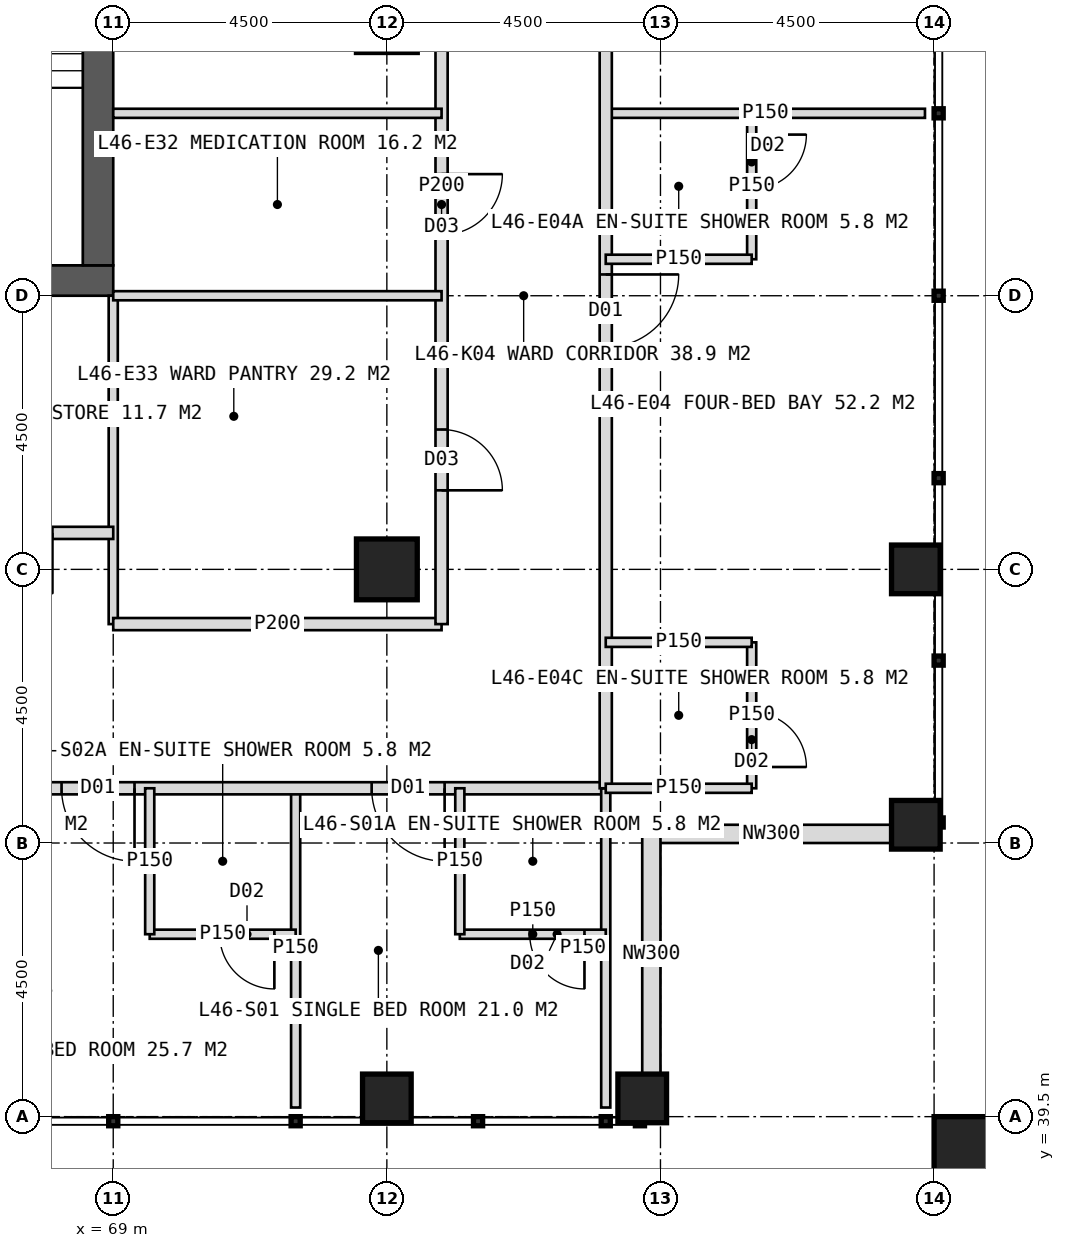
"""IFC4 building model, lengths in metres.
Left out: names, types, materials, properties, quantities, classifications, styles, units other than length and angle.
Written with IfcOpenShell. Run it as: python <this file> out.ifc"""

import sys

from ifc_helpers import new_model, si_unit, direction, frame, frame_2d, origin, origin_2d, place, context, subcontext, project, spatial, rectangle, hollow_rectangle, extrude, element, fill, save


model = new_model("IFC4")
c1 = context("Model", 3, precision=1e-05, world=origin(), true_north=direction((0.0, 1.0)))
c2 = subcontext(c1, "Body", "Model", "MODEL_VIEW")
j1 = project(units=[si_unit("LENGTHUNIT", "METRE"), si_unit("PLANEANGLEUNIT", "RADIAN")], contexts=[c1])
p1 = place(None, origin())
s1 = spatial("IfcSite", under=j1, at=p1, CompositionType="ELEMENT")
p2 = place(p1, origin())
s2 = spatial("IfcBuilding", under=s1, at=p2, CompositionType="ELEMENT")
p3 = place(p2, frame((0.0, 0.0, 193.0)))
s3 = spatial("IfcBuildingStorey", under=s2, at=p3, CompositionType="ELEMENT", Elevation=193.0)
p4 = place(p3, frame((51.0, 53.25, 0.0), z_axis=(0.0, 0.0, 1.0), x_axis=(1.0, 0.0, 0.0)))
e1 = element("IfcWall", 1, at=p4, inside=s3, PredefinedType="SHEAR", context=c2, shape_type="SweptSolid", body=[
    extrude(rectangle(XDim=18.0, YDim=0.5, at=frame_2d((9.0, 0.0))), origin(), (0.0, 0.0, 1.0), 4.0),
])
p5 = place(p4, frame((8.1, 0.0, 0.0)))
e2 = element("IfcOpeningElement", 2, at=p5, cuts=e1, PredefinedType="OPENING", context=c2, shape_type="SweptSolid", body=[
    extrude(rectangle(XDim=1.8, YDim=2.2, at=frame_2d((0.9, 1.1))), frame((0.0, 0.26, 0.0), z_axis=(0.0, -1.0, 0.0), x_axis=(1.0, 0.0, 0.0)), (0.0, 0.0, 1.0), 0.52),
])
p6 = place(p3, frame((68.75, 53.5, 0.0), z_axis=(0.0, 0.0, 1.0), x_axis=(0.0, 1.0, 0.0)))
e3 = element("IfcWall", 3, at=p6, inside=s3, PredefinedType="SHEAR", context=c2, shape_type="SweptSolid", body=[
    extrude(rectangle(XDim=17.0, YDim=0.5, at=frame_2d((8.5, 0.0))), origin(), (0.0, 0.0, 1.0), 4.0),
])
p7 = place(p6, frame((9.6, 0.0, 0.0)))
e4 = element("IfcOpeningElement", 4, at=p7, cuts=e3, PredefinedType="OPENING", context=c2, shape_type="SweptSolid", body=[
    extrude(rectangle(XDim=1.5, YDim=2.2, at=frame_2d((0.75, 1.1))), frame((0.0, 0.26, 0.0), z_axis=(0.0, -1.0, 0.0), x_axis=(1.0, 0.0, 0.0)), (0.0, 0.0, 1.0), 0.52),
])
p8 = place(p3, frame((73.5, 48.5, 0.0), z_axis=(0.0, 0.0, 1.0), x_axis=(1.0, 0.0, 0.0)))
e5 = element("IfcColumn", 5, at=p8, inside=s3, PredefinedType="COLUMN", context=c2, shape_type="SweptSolid", body=[
    extrude(hollow_rectangle(XDim=1.0, YDim=1.0, WallThickness=0.1, at=origin_2d()), origin(), (0.0, 0.0, 1.0), 4.0),
])
for number, where, z_axis, x_axis in (
    (6, (82.2, 44.3, 0.0), (0.0, 0.0, 1.0), (1.0, 0.0, 0.0)),
    (7, (82.2, 48.5, 0.0), (0.0, 0.0, 1.0), (1.0, 0.0, 0.0)),
    (8, (73.5, 39.8, 0.0), (0.0, 0.0, 1.0), (1.0, 0.0, 0.0)),
    (9, (77.7, 39.8, 0.0), (0.0, 0.0, 1.0), (1.0, 0.0, 0.0)),
):
    element("IfcColumn", number, at=place(p3, frame(where, z_axis=z_axis, x_axis=x_axis)), inside=s3, PredefinedType="COLUMN", context=c2, shape_type="SweptSolid", body=[
        extrude(hollow_rectangle(XDim=0.8, YDim=0.8, WallThickness=0.08, at=origin_2d()), origin(), (0.0, 0.0, 1.0), 4.0),
    ])
p9 = place(p3, frame((83.1, 38.9, 0.0), z_axis=(0.0, 0.0, 1.0), x_axis=(1.0, 0.0, 0.0)))
e10 = element("IfcColumn", 10, at=p9, inside=s3, PredefinedType="COLUMN", context=c2, shape_type="SweptSolid", body=[
    extrude(hollow_rectangle(XDim=1.2, YDim=1.2, WallThickness=0.07, at=origin_2d()), origin(), (0.0, 0.0, 1.0), 4.0),
])
for number, where, z_axis, x_axis in (
    (11, (81.8, 44.15, 0.0), (0.0, 0.0, 1.0), (-1.0, 0.0, 0.0)),
    (12, (77.85, 44.15, 0.0), (0.0, 0.0, 1.0), (0.0, -1.0, 0.0)),
):
    element("IfcWall", number, at=place(p3, frame(where, z_axis=z_axis, x_axis=x_axis)), inside=s3, PredefinedType="ELEMENTEDWALL", context=c2, shape_type="SweptSolid", body=[
        extrude(rectangle(XDim=3.95, YDim=0.3, at=frame_2d((1.975, 0.0))), origin(), (0.0, 0.0, 1.0), 2.85),
    ])
p10 = place(p3, frame((72.0, 44.9, 0.0), z_axis=(0.0, 0.0, 1.0), x_axis=(0.0, -1.0, 0.0)))
e13 = element("IfcWall", 13, at=p10, inside=s3, PredefinedType="PARTITIONING", context=c2, shape_type="SweptSolid", body=[
    extrude(rectangle(XDim=5.25, YDim=0.15, at=frame_2d((2.625, 0.0))), origin(), (0.0, 0.0, 1.0), 3.75),
])
p11 = place(p3, frame((77.1, 44.9, 0.0), z_axis=(0.0, 0.0, 1.0), x_axis=(-1.0, 0.0, 0.0)))
e14 = element("IfcWall", 14, at=p11, inside=s3, PredefinedType="PARTITIONING", context=c2, shape_type="SweptSolid", body=[
    extrude(rectangle(XDim=34.2, YDim=0.2, at=frame_2d((17.1, 0.0))), origin(), (0.0, 0.0, 1.0), 3.75),
])
p12 = place(p11, frame((2.65, 0.0, 0.0)))
e15 = element("IfcOpeningElement", 15, at=p12, cuts=e14, PredefinedType="OPENING", context=c2, shape_type="SweptSolid", body=[
    extrude(rectangle(XDim=1.2, YDim=2.2, at=frame_2d((0.6, 1.1))), frame((0.0, 0.11, 0.0), z_axis=(0.0, -1.0, 0.0), x_axis=(1.0, 0.0, 0.0)), (0.0, 0.0, 1.0), 0.22),
])
p13 = place(p11, frame((7.75, 0.0, 0.0)))
e16 = element("IfcOpeningElement", 16, at=p13, cuts=e14, PredefinedType="OPENING", context=c2, shape_type="SweptSolid", body=[
    extrude(rectangle(XDim=1.2, YDim=2.2, at=frame_2d((0.6, 1.1))), frame((0.0, 0.11, 0.0), z_axis=(0.0, -1.0, 0.0), x_axis=(1.0, 0.0, 0.0)), (0.0, 0.0, 1.0), 0.22),
])
p14 = place(p11, frame((13.75, 0.0, 0.0)))
e17 = element("IfcOpeningElement", 17, at=p14, cuts=e14, PredefinedType="OPENING", context=c2, shape_type="SweptSolid", body=[
    extrude(rectangle(XDim=1.2, YDim=2.2, at=frame_2d((0.6, 1.1))), frame((0.0, 0.11, 0.0), z_axis=(0.0, -1.0, 0.0), x_axis=(1.0, 0.0, 0.0)), (0.0, 0.0, 1.0), 0.22),
])
p15 = place(p11, frame((19.75, 0.0, 0.0)))
e18 = element("IfcOpeningElement", 18, at=p15, cuts=e14, PredefinedType="OPENING", context=c2, shape_type="SweptSolid", body=[
    extrude(rectangle(XDim=1.2, YDim=2.2, at=frame_2d((0.6, 1.1))), frame((0.0, 0.11, 0.0), z_axis=(0.0, -1.0, 0.0), x_axis=(1.0, 0.0, 0.0)), (0.0, 0.0, 1.0), 0.22),
])
p16 = place(p11, frame((25.75, 0.0, 0.0)))
e19 = element("IfcOpeningElement", 19, at=p16, cuts=e14, PredefinedType="OPENING", context=c2, shape_type="SweptSolid", body=[
    extrude(rectangle(XDim=1.2, YDim=2.2, at=frame_2d((0.6, 1.1))), frame((0.0, 0.11, 0.0), z_axis=(0.0, -1.0, 0.0), x_axis=(1.0, 0.0, 0.0)), (0.0, 0.0, 1.0), 0.22),
])
p17 = place(p3, frame((77.1, 44.9, 0.0), z_axis=(0.0, 0.0, 1.0), x_axis=(0.0, -1.0, 0.0)))
e20 = element("IfcWall", 20, at=p17, inside=s3, PredefinedType="PARTITIONING", context=c2, shape_type="SweptSolid", body=[
    extrude(rectangle(XDim=5.25, YDim=0.15, at=frame_2d((2.625, 0.0))), origin(), (0.0, 0.0, 1.0), 3.75),
])
p18 = place(p3, frame((77.1, 42.5, 0.0), z_axis=(0.0, 0.0, 1.0), x_axis=(-1.0, 0.0, 0.0)))
e21 = element("IfcWall", 21, at=p18, inside=s3, PredefinedType="PARTITIONING", context=c2, shape_type="SweptSolid", body=[
    extrude(rectangle(XDim=2.4, YDim=0.15, at=frame_2d((1.2, 0.0))), origin(), (0.0, 0.0, 1.0), 3.75),
])
p19 = place(p18, frame((0.35, 0.0, 0.0)))
e22 = element("IfcOpeningElement", 22, at=p19, cuts=e21, PredefinedType="OPENING", context=c2, shape_type="SweptSolid", body=[
    extrude(rectangle(XDim=0.9, YDim=2.1, at=frame_2d((0.45, 1.05))), frame((0.0, 0.085, 0.0), z_axis=(0.0, -1.0, 0.0), x_axis=(1.0, 0.0, 0.0)), (0.0, 0.0, 1.0), 0.17),
])
p20 = place(p3, frame((74.7, 44.9, 0.0), z_axis=(0.0, 0.0, 1.0), x_axis=(0.0, -1.0, 0.0)))
e23 = element("IfcWall", 23, at=p20, inside=s3, PredefinedType="PARTITIONING", context=c2, shape_type="SweptSolid", body=[
    extrude(rectangle(XDim=2.4, YDim=0.15, at=frame_2d((1.2, 0.0))), origin(), (0.0, 0.0, 1.0), 3.75),
])
p21 = place(p3, frame((72.0, 42.5, 0.0), z_axis=(0.0, 0.0, 1.0), x_axis=(-1.0, 0.0, 0.0)))
e24 = element("IfcWall", 24, at=p21, inside=s3, PredefinedType="PARTITIONING", context=c2, shape_type="SweptSolid", body=[
    extrude(rectangle(XDim=2.4, YDim=0.15, at=frame_2d((1.2, 0.0))), origin(), (0.0, 0.0, 1.0), 3.75),
])
p22 = place(p21, frame((0.35, 0.0, 0.0)))
e25 = element("IfcOpeningElement", 25, at=p22, cuts=e24, PredefinedType="OPENING", context=c2, shape_type="SweptSolid", body=[
    extrude(rectangle(XDim=0.9, YDim=2.1, at=frame_2d((0.45, 1.05))), frame((0.0, 0.085, 0.0), z_axis=(0.0, -1.0, 0.0), x_axis=(1.0, 0.0, 0.0)), (0.0, 0.0, 1.0), 0.17),
])
p23 = place(p3, frame((69.6, 44.9, 0.0), z_axis=(0.0, 0.0, 1.0), x_axis=(0.0, -1.0, 0.0)))
e26 = element("IfcWall", 26, at=p23, inside=s3, PredefinedType="PARTITIONING", context=c2, shape_type="SweptSolid", body=[
    extrude(rectangle(XDim=2.4, YDim=0.15, at=frame_2d((1.2, 0.0))), origin(), (0.0, 0.0, 1.0), 3.75),
])
p24 = place(p3, frame((69.0, 53.0, 0.0), z_axis=(0.0, 0.0, 1.0), x_axis=(0.0, -1.0, 0.0)))
e27 = element("IfcWall", 27, at=p24, inside=s3, PredefinedType="PARTITIONING", context=c2, shape_type="SweptSolid", body=[
    extrude(rectangle(XDim=5.4, YDim=0.15, at=frame_2d((2.7, 0.0))), origin(), (0.0, 0.0, 1.0), 3.75),
])
p25 = place(p3, frame((74.4, 47.6, 0.0), z_axis=(0.0, 0.0, 1.0), x_axis=(-1.0, 0.0, 0.0)))
e28 = element("IfcWall", 28, at=p25, inside=s3, PredefinedType="PARTITIONING", context=c2, shape_type="SweptSolid", body=[
    extrude(rectangle(XDim=5.4, YDim=0.2, at=frame_2d((2.7, 0.0))), origin(), (0.0, 0.0, 1.0), 3.75),
])
p26 = place(p3, frame((69.0, 49.1, 0.0), z_axis=(0.0, 0.0, 1.0), x_axis=(-1.0, 0.0, 0.0)))
e29 = element("IfcWall", 29, at=p26, inside=s3, PredefinedType="PARTITIONING", context=c2, shape_type="SweptSolid", body=[
    extrude(rectangle(XDim=6.75, YDim=0.2, at=frame_2d((3.375, 0.0))), origin(), (0.0, 0.0, 1.0), 3.75),
])
p27 = place(p26, frame((1.0, 0.0, 0.0)))
e30 = element("IfcOpeningElement", 30, at=p27, cuts=e29, PredefinedType="OPENING", context=c2, shape_type="SweptSolid", body=[
    extrude(rectangle(XDim=1.0, YDim=2.1, at=frame_2d((0.5, 1.05))), frame((0.0, 0.11, 0.0), z_axis=(0.0, -1.0, 0.0), x_axis=(1.0, 0.0, 0.0)), (0.0, 0.0, 1.0), 0.22),
])
p28 = place(p26, frame((5.425, 0.0, 0.0)))
e31 = element("IfcOpeningElement", 31, at=p28, cuts=e29, PredefinedType="OPENING", context=c2, shape_type="SweptSolid", body=[
    extrude(rectangle(XDim=1.0, YDim=2.1, at=frame_2d((0.5, 1.05))), frame((0.0, 0.11, 0.0), z_axis=(0.0, -1.0, 0.0), x_axis=(1.0, 0.0, 0.0)), (0.0, 0.0, 1.0), 0.22),
])
p29 = place(p3, frame((77.1, 56.0, 0.0), z_axis=(0.0, 0.0, 1.0), x_axis=(1.0, 0.0, 0.0)))
e32 = element("IfcWall", 32, at=p29, inside=s3, PredefinedType="PARTITIONING", context=c2, shape_type="SweptSolid", body=[
    extrude(rectangle(XDim=5.25, YDim=0.15, at=frame_2d((2.625, 0.0))), origin(), (0.0, 0.0, 1.0), 3.75),
])
p30 = place(p3, frame((77.1, 79.1, 0.0), z_axis=(0.0, 0.0, 1.0), x_axis=(0.0, -1.0, 0.0)))
e33 = element("IfcWall", 33, at=p30, inside=s3, PredefinedType="PARTITIONING", context=c2, shape_type="SweptSolid", body=[
    extrude(rectangle(XDim=34.2, YDim=0.2, at=frame_2d((17.1, 0.0))), origin(), (0.0, 0.0, 1.0), 3.75),
])
p31 = place(p30, frame((3.25, 0.0, 0.0)))
e34 = element("IfcOpeningElement", 34, at=p31, cuts=e33, PredefinedType="OPENING", context=c2, shape_type="SweptSolid", body=[
    extrude(rectangle(XDim=1.2, YDim=2.2, at=frame_2d((0.6, 1.1))), frame((0.0, 0.11, 0.0), z_axis=(0.0, -1.0, 0.0), x_axis=(1.0, 0.0, 0.0)), (0.0, 0.0, 1.0), 0.22),
])
p32 = place(p30, frame((11.35, 0.0, 0.0)))
e35 = element("IfcOpeningElement", 35, at=p32, cuts=e33, PredefinedType="OPENING", context=c2, shape_type="SweptSolid", body=[
    extrude(rectangle(XDim=1.2, YDim=2.2, at=frame_2d((0.6, 1.1))), frame((0.0, 0.11, 0.0), z_axis=(0.0, -1.0, 0.0), x_axis=(1.0, 0.0, 0.0)), (0.0, 0.0, 1.0), 0.22),
])
p33 = place(p30, frame((19.75, 0.0, 0.0)))
e36 = element("IfcOpeningElement", 36, at=p33, cuts=e33, PredefinedType="OPENING", context=c2, shape_type="SweptSolid", body=[
    extrude(rectangle(XDim=1.2, YDim=2.2, at=frame_2d((0.6, 1.1))), frame((0.0, 0.11, 0.0), z_axis=(0.0, -1.0, 0.0), x_axis=(1.0, 0.0, 0.0)), (0.0, 0.0, 1.0), 0.22),
])
p34 = place(p30, frame((25.75, 0.0, 0.0)))
e37 = element("IfcOpeningElement", 37, at=p34, cuts=e33, PredefinedType="OPENING", context=c2, shape_type="SweptSolid", body=[
    extrude(rectangle(XDim=1.2, YDim=2.2, at=frame_2d((0.6, 1.1))), frame((0.0, 0.11, 0.0), z_axis=(0.0, -1.0, 0.0), x_axis=(1.0, 0.0, 0.0)), (0.0, 0.0, 1.0), 0.22),
])
p35 = place(p3, frame((79.5, 56.0, 0.0), z_axis=(0.0, 0.0, 1.0), x_axis=(0.0, -1.0, 0.0)))
e38 = element("IfcWall", 38, at=p35, inside=s3, PredefinedType="PARTITIONING", context=c2, shape_type="SweptSolid", body=[
    extrude(rectangle(XDim=2.4, YDim=0.15, at=frame_2d((1.2, 0.0))), origin(), (0.0, 0.0, 1.0), 3.75),
])
p36 = place(p35, frame((0.35, 0.0, 0.0)))
e39 = element("IfcOpeningElement", 39, at=p36, cuts=e38, PredefinedType="OPENING", context=c2, shape_type="SweptSolid", body=[
    extrude(rectangle(XDim=0.9, YDim=2.1, at=frame_2d((0.45, 1.05))), frame((0.0, 0.085, 0.0), z_axis=(0.0, -1.0, 0.0), x_axis=(1.0, 0.0, 0.0)), (0.0, 0.0, 1.0), 0.17),
])
p37 = place(p3, frame((77.1, 53.6, 0.0), z_axis=(0.0, 0.0, 1.0), x_axis=(1.0, 0.0, 0.0)))
e40 = element("IfcWall", 40, at=p37, inside=s3, PredefinedType="PARTITIONING", context=c2, shape_type="SweptSolid", body=[
    extrude(rectangle(XDim=2.4, YDim=0.15, at=frame_2d((1.2, 0.0))), origin(), (0.0, 0.0, 1.0), 3.75),
])
p38 = place(p3, frame((79.5, 47.3, 0.0), z_axis=(0.0, 0.0, 1.0), x_axis=(0.0, -1.0, 0.0)))
e41 = element("IfcWall", 41, at=p38, inside=s3, PredefinedType="PARTITIONING", context=c2, shape_type="SweptSolid", body=[
    extrude(rectangle(XDim=2.4, YDim=0.15, at=frame_2d((1.2, 0.0))), origin(), (0.0, 0.0, 1.0), 3.75),
])
p39 = place(p38, frame((1.15, 0.0, 0.0)))
e42 = element("IfcOpeningElement", 42, at=p39, cuts=e41, PredefinedType="OPENING", context=c2, shape_type="SweptSolid", body=[
    extrude(rectangle(XDim=0.9, YDim=2.1, at=frame_2d((0.45, 1.05))), frame((0.0, 0.085, 0.0), z_axis=(0.0, -1.0, 0.0), x_axis=(1.0, 0.0, 0.0)), (0.0, 0.0, 1.0), 0.17),
])
for number, where, z_axis, x_axis in (
    (43, (77.1, 47.3, 0.0), (0.0, 0.0, 1.0), (1.0, 0.0, 0.0)),
    (44, (77.1, 44.9, 0.0), (0.0, 0.0, 1.0), (1.0, 0.0, 0.0)),
):
    element("IfcWall", number, at=place(p3, frame(where, z_axis=z_axis, x_axis=x_axis)), inside=s3, PredefinedType="PARTITIONING", context=c2, shape_type="SweptSolid", body=[
        extrude(rectangle(XDim=2.4, YDim=0.15, at=frame_2d((1.2, 0.0))), origin(), (0.0, 0.0, 1.0), 3.75),
    ])
p40 = place(p3, frame((74.4, 62.0, 0.0), z_axis=(0.0, 0.0, 1.0), x_axis=(0.0, -1.0, 0.0)))
e45 = element("IfcWall", 45, at=p40, inside=s3, PredefinedType="PARTITIONING", context=c2, shape_type="SweptSolid", body=[
    extrude(rectangle(XDim=14.4, YDim=0.2, at=frame_2d((7.2, 0.0))), origin(), (0.0, 0.0, 1.0), 3.75),
])
p41 = place(p40, frame((2.5, 0.0, 0.0)))
e46 = element("IfcOpeningElement", 46, at=p41, cuts=e45, PredefinedType="OPENING", context=c2, shape_type="SweptSolid", body=[
    extrude(rectangle(XDim=1.0, YDim=2.1, at=frame_2d((0.5, 1.05))), frame((0.0, 0.11, 0.0), z_axis=(0.0, -1.0, 0.0), x_axis=(1.0, 0.0, 0.0)), (0.0, 0.0, 1.0), 0.22),
])
p42 = place(p40, frame((7.0, 0.0, 0.0)))
e47 = element("IfcOpeningElement", 47, at=p42, cuts=e45, PredefinedType="OPENING", context=c2, shape_type="SweptSolid", body=[
    extrude(rectangle(XDim=1.0, YDim=2.1, at=frame_2d((0.5, 1.05))), frame((0.0, 0.11, 0.0), z_axis=(0.0, -1.0, 0.0), x_axis=(1.0, 0.0, 0.0)), (0.0, 0.0, 1.0), 0.22),
])
p43 = place(p40, frame((11.2, 0.0, 0.0)))
e48 = element("IfcOpeningElement", 48, at=p43, cuts=e45, PredefinedType="OPENING", context=c2, shape_type="SweptSolid", body=[
    extrude(rectangle(XDim=1.0, YDim=2.1, at=frame_2d((0.5, 1.05))), frame((0.0, 0.11, 0.0), z_axis=(0.0, -1.0, 0.0), x_axis=(1.0, 0.0, 0.0)), (0.0, 0.0, 1.0), 0.22),
])
for number, where, z_axis, x_axis in (
    (49, (69.0, 56.0, 0.0), (0.0, 0.0, 1.0), (1.0, 0.0, 0.0)),
    (50, (69.0, 53.0, 0.0), (0.0, 0.0, 1.0), (1.0, 0.0, 0.0)),
):
    element("IfcWall", number, at=place(p3, frame(where, z_axis=z_axis, x_axis=x_axis)), inside=s3, PredefinedType="PARTITIONING", context=c2, shape_type="SweptSolid", body=[
        extrude(rectangle(XDim=5.4, YDim=0.15, at=frame_2d((2.7, 0.0))), origin(), (0.0, 0.0, 1.0), 3.75),
    ])
p44 = place(p12, origin())
e51 = element("IfcDoor", 51, at=p44, inside=s3, OperationType="SINGLE_SWING_LEFT", PredefinedType="DOOR", context=c2, shape_type="SweptSolid", body=[
    extrude(rectangle(XDim=1.2, YDim=2.2, at=frame_2d((0.6, 1.1))), frame((0.0, 0.025, 0.0), z_axis=(0.0, -1.0, 0.0), x_axis=(1.0, 0.0, 0.0)), (0.0, 0.0, 1.0), 0.05),
])
fill(e15, e51)
p45 = place(p19, origin())
e52 = element("IfcDoor", 52, at=p45, inside=s3, OperationType="SINGLE_SWING_LEFT", PredefinedType="DOOR", context=c2, shape_type="SweptSolid", body=[
    extrude(rectangle(XDim=0.9, YDim=2.1, at=frame_2d((0.45, 1.05))), frame((0.0, 0.025, 0.0), z_axis=(0.0, -1.0, 0.0), x_axis=(1.0, 0.0, 0.0)), (0.0, 0.0, 1.0), 0.05),
])
fill(e22, e52)
p46 = place(p13, origin())
e53 = element("IfcDoor", 53, at=p46, inside=s3, OperationType="SINGLE_SWING_LEFT", PredefinedType="DOOR", context=c2, shape_type="SweptSolid", body=[
    extrude(rectangle(XDim=1.2, YDim=2.2, at=frame_2d((0.6, 1.1))), frame((0.0, 0.025, 0.0), z_axis=(0.0, -1.0, 0.0), x_axis=(1.0, 0.0, 0.0)), (0.0, 0.0, 1.0), 0.05),
])
fill(e16, e53)
p47 = place(p22, origin())
e54 = element("IfcDoor", 54, at=p47, inside=s3, OperationType="SINGLE_SWING_LEFT", PredefinedType="DOOR", context=c2, shape_type="SweptSolid", body=[
    extrude(rectangle(XDim=0.9, YDim=2.1, at=frame_2d((0.45, 1.05))), frame((0.0, 0.025, 0.0), z_axis=(0.0, -1.0, 0.0), x_axis=(1.0, 0.0, 0.0)), (0.0, 0.0, 1.0), 0.05),
])
fill(e25, e54)
p48 = place(p34, origin())
e55 = element("IfcDoor", 55, at=p48, inside=s3, OperationType="SINGLE_SWING_LEFT", PredefinedType="DOOR", context=c2, shape_type="SweptSolid", body=[
    extrude(rectangle(XDim=1.2, YDim=2.2, at=frame_2d((0.6, 1.1))), frame((0.0, 0.025, 0.0), z_axis=(0.0, -1.0, 0.0), x_axis=(1.0, 0.0, 0.0)), (0.0, 0.0, 1.0), 0.05),
])
fill(e37, e55)
p49 = place(p36, origin())
e56 = element("IfcDoor", 56, at=p49, inside=s3, OperationType="SINGLE_SWING_LEFT", PredefinedType="DOOR", context=c2, shape_type="SweptSolid", body=[
    extrude(rectangle(XDim=0.9, YDim=2.1, at=frame_2d((0.45, 1.05))), frame((0.0, 0.025, 0.0), z_axis=(0.0, -1.0, 0.0), x_axis=(1.0, 0.0, 0.0)), (0.0, 0.0, 1.0), 0.05),
])
fill(e39, e56)
p50 = place(p39, origin())
e57 = element("IfcDoor", 57, at=p50, inside=s3, OperationType="SINGLE_SWING_RIGHT", PredefinedType="DOOR", context=c2, shape_type="SweptSolid", body=[
    extrude(rectangle(XDim=0.9, YDim=2.1, at=frame_2d((0.45, 1.05))), frame((0.0, 0.025, 0.0), z_axis=(0.0, -1.0, 0.0), x_axis=(1.0, 0.0, 0.0)), (0.0, 0.0, 1.0), 0.05),
])
fill(e42, e57)
p51 = place(p42, origin())
e58 = element("IfcDoor", 58, at=p51, inside=s3, OperationType="SINGLE_SWING_LEFT", PredefinedType="DOOR", context=c2, shape_type="SweptSolid", body=[
    extrude(rectangle(XDim=1.0, YDim=2.1, at=frame_2d((0.5, 1.05))), frame((0.0, 0.025, 0.0), z_axis=(0.0, -1.0, 0.0), x_axis=(1.0, 0.0, 0.0)), (0.0, 0.0, 1.0), 0.05),
])
fill(e47, e58)
p52 = place(p43, origin())
e59 = element("IfcDoor", 59, at=p52, inside=s3, OperationType="SINGLE_SWING_RIGHT", PredefinedType="DOOR", context=c2, shape_type="SweptSolid", body=[
    extrude(rectangle(XDim=1.0, YDim=2.1, at=frame_2d((0.5, 1.05))), frame((0.0, 0.025, 0.0), z_axis=(0.0, -1.0, 0.0), x_axis=(1.0, 0.0, 0.0)), (0.0, 0.0, 1.0), 0.05),
])
fill(e48, e59)
save(model, sys.argv[1])
